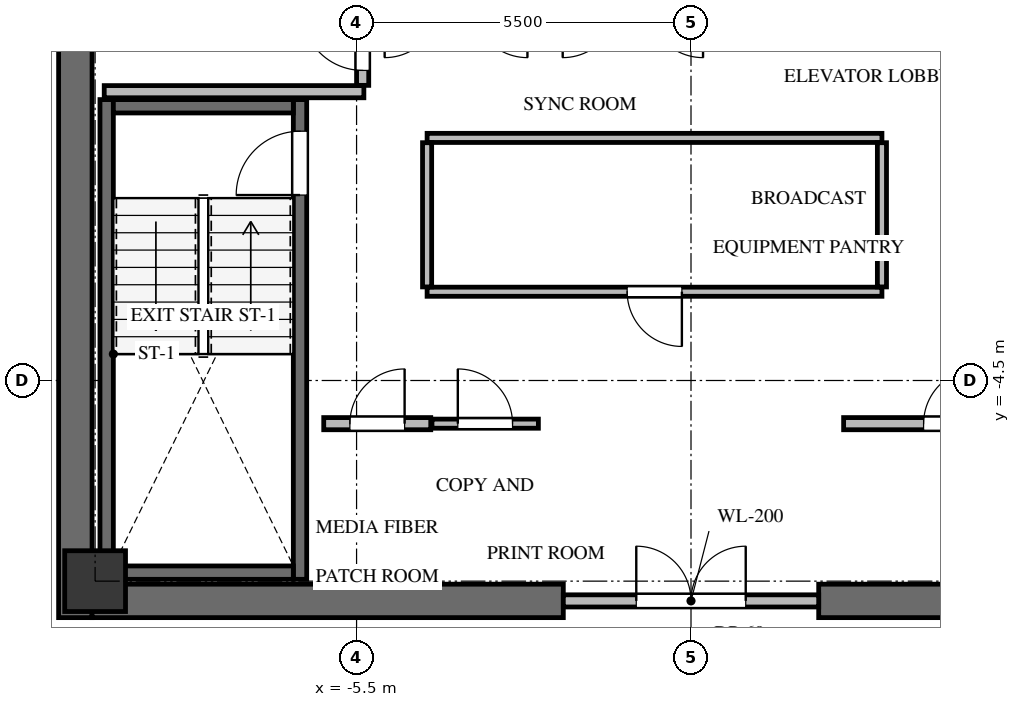
"""IFC4 building model, lengths in metres.
Left out: names, types, materials, properties, quantities, classifications, styles, units other than length and angle.
Written with IfcOpenShell. Run it as: python <this file> out.ifc"""

import sys

from ifc_helpers import new_model, si_unit, direction, frame, frame_2d, origin, origin_2d, place, context, subcontext, project, spatial, rectangle, extrude, source, transform, mapped, element, fill, save


model = new_model("IFC4")
c1 = context("Model", 3, precision=1e-05, world=origin(), true_north=direction((0.0, 1.0)))
c2 = subcontext(c1, "Body", "Model", "MODEL_VIEW")
j1 = project(units=[si_unit("LENGTHUNIT", "METRE"), si_unit("PLANEANGLEUNIT", "RADIAN")], contexts=[c1])
p1 = place(None, origin())
s1 = spatial("IfcSite", under=j1, at=p1, CompositionType="ELEMENT")
p2 = place(p1, origin())
s2 = spatial("IfcBuilding", under=s1, at=p2, CompositionType="ELEMENT")
p3 = place(p2, frame((0.0, 0.0, 221.6)))
s3 = spatial("IfcBuildingStorey", under=s2, at=p3, CompositionType="ELEMENT", Elevation=221.6)
p4 = place(p3, frame((-10.125, -8.4, 0.0), z_axis=(0.0, 0.0, 1.0), x_axis=(0.0, 1.0, 0.0)))
e1 = element("IfcWall", 1, at=p4, inside=s3, PredefinedType="SHEAR", context=c2, shape_type="SweptSolid", body=[
    extrude(rectangle(XDim=16.8, YDim=0.55, at=frame_2d((8.4, 0.0))), origin(), (0.0, 0.0, 1.0), 3.3),
])
for number, where, z_axis, x_axis in (
    (2, (-9.85, -8.125, 0.0), (0.0, 0.0, 1.0), (1.0, 0.0, 0.0)),
    (3, (2.1, -8.125, 0.0), (0.0, 0.0, 1.0), (1.0, 0.0, 0.0)),
):
    element("IfcWall", number, at=place(p3, frame(where, z_axis=z_axis, x_axis=x_axis)), inside=s3, PredefinedType="SHEAR", context=c2, shape_type="SweptSolid", body=[
        extrude(rectangle(XDim=7.75, YDim=0.55, at=frame_2d((3.875, 0.0))), origin(), (0.0, 0.0, 1.0), 3.3),
    ])
p5 = place(p3, frame((-6.43, -7.77, -0.24), z_axis=(0.0, 0.0, 1.0), x_axis=(0.0, 1.0, 0.0)))
e4 = element("IfcWall", 4, at=p5, inside=s3, PredefinedType="SHEAR", context=c2, shape_type="SweptSolid", body=[
    extrude(rectangle(XDim=7.89, YDim=0.22, at=frame_2d((3.945, 0.0))), origin(), (0.0, 0.0, 1.0), 3.3),
])
p6 = place(p5, frame((6.32, 0.0, 0.0)))
e5 = element("IfcOpeningElement", 5, at=p6, cuts=e4, PredefinedType="OPENING", context=c2, shape_type="SweptSolid", body=[
    extrude(rectangle(XDim=1.05, YDim=2.15, at=frame_2d((0.525, 1.075))), frame((0.0, 0.12, 0.0), z_axis=(0.0, -1.0, 0.0), x_axis=(1.0, 0.0, 0.0)), (0.0, 0.0, 1.0), 0.24),
])
p7 = place(p3, frame((-9.61, 0.12, -0.24), z_axis=(0.0, 0.0, 1.0), x_axis=(0.0, -1.0, 0.0)))
e6 = element("IfcWall", 6, at=p7, inside=s3, PredefinedType="SHEAR", context=c2, shape_type="SweptSolid", body=[
    extrude(rectangle(XDim=7.89, YDim=0.22, at=frame_2d((3.945, 0.0))), origin(), (0.0, 0.0, 1.0), 3.3),
])
for number, where, z_axis, x_axis in (
    (7, (-9.5, -7.66, -0.24), (0.0, 0.0, 1.0), (1.0, 0.0, 0.0)),
    (8, (-6.54, 0.01, -0.24), (0.0, 0.0, 1.0), (-1.0, 0.0, 0.0)),
):
    element("IfcWall", number, at=place(p3, frame(where, z_axis=z_axis, x_axis=x_axis)), inside=s3, PredefinedType="SHEAR", context=c2, shape_type="SweptSolid", body=[
        extrude(rectangle(XDim=2.96, YDim=0.22, at=frame_2d((1.48, 0.0))), origin(), (0.0, 0.0, 1.0), 3.3),
    ])
m1 = source(origin(), c2, "Body", "SweptSolid", [
    extrude(rectangle(XDim=1.0, YDim=1.0, at=origin_2d()), origin(), (0.0, 0.0, 1.0), 3.3),
])
p8 = place(p3, frame((-9.8, -7.8, -0.24), z_axis=(0.0, 0.0, 1.0), x_axis=(1.0, 0.0, 0.0)))
e9 = element("IfcColumn", 9, at=p8, inside=s3, PredefinedType="COLUMN", context=c2, shape_type="MappedRepresentation", body=[
    mapped(m1, transform((0.0, 0.0, 0.0), x_axis=(1.0, 0.0, 0.0), y_axis=(0.0, 1.0, 0.0), z_axis=(0.0, 0.0, 1.0), scale=1.0)),
])
p9 = place(p3, frame((-2.1, -8.125, 0.0), z_axis=(0.0, 0.0, 1.0), x_axis=(1.0, 0.0, 0.0)))
e10 = element("IfcWall", 10, at=p9, inside=s3, PredefinedType="SOLIDWALL", context=c2, shape_type="SweptSolid", body=[
    extrude(rectangle(XDim=4.2, YDim=0.2, at=frame_2d((2.1, 0.0))), origin(), (0.0, 0.0, 1.0), 3.045),
])
p10 = place(p9, frame((1.2, 0.0, 0.0)))
e11 = element("IfcOpeningElement", 11, at=p10, cuts=e10, PredefinedType="OPENING", context=c2, shape_type="SweptSolid", body=[
    extrude(rectangle(XDim=1.8, YDim=2.15, at=frame_2d((0.9, 1.075))), frame((0.0, 0.11, 0.0), z_axis=(0.0, -1.0, 0.0), x_axis=(1.0, 0.0, 0.0)), (0.0, 0.0, 1.0), 0.22),
])
p11 = place(p3, frame((-9.65, 0.25, 0.0), z_axis=(0.0, 0.0, 1.0), x_axis=(1.0, 0.0, 0.0)))
e12 = element("IfcWall", 12, at=p11, inside=s3, PredefinedType="SOLIDWALL", context=c2, shape_type="SweptSolid", body=[
    extrude(rectangle(XDim=4.27, YDim=0.2, at=frame_2d((2.135, 0.0))), origin(), (0.0, 0.0, 1.0), 3.045),
])
p12 = place(p3, frame((-5.4, 0.354, 0.0), z_axis=(0.0, 0.0, 1.0), x_axis=(0.0, 1.0, 0.0)))
e13 = element("IfcWall", 13, at=p12, inside=s3, PredefinedType="SOLIDWALL", context=c2, shape_type="SweptSolid", body=[
    extrude(rectangle(XDim=4.026, YDim=0.2, at=frame_2d((2.013, 0.0))), origin(), (0.0, 0.0, 1.0), 3.045),
])
p13 = place(p12, frame((0.246, 0.0, 0.0)))
e14 = element("IfcOpeningElement", 14, at=p13, cuts=e13, PredefinedType="OPENING", context=c2, shape_type="SweptSolid", body=[
    extrude(rectangle(XDim=1.0, YDim=2.15, at=frame_2d((0.5, 1.075))), frame((0.0, 0.11, 0.0), z_axis=(0.0, -1.0, 0.0), x_axis=(1.0, 0.0, 0.0)), (0.0, 0.0, 1.0), 0.22),
])
p14 = place(p3, frame((-6.04, -5.21, 0.0), z_axis=(0.0, 0.0, 1.0), x_axis=(1.0, 0.0, 0.0)))
e15 = element("IfcWall", 15, at=p14, inside=s3, PredefinedType="SOLIDWALL", context=c2, shape_type="SweptSolid", body=[
    extrude(rectangle(XDim=1.76, YDim=0.2, at=frame_2d((0.88, 0.0))), origin(), (0.0, 0.0, 1.0), 3.045),
])
p15 = place(p14, frame((0.43, 0.0, 0.0)))
e16 = element("IfcOpeningElement", 16, at=p15, cuts=e15, PredefinedType="OPENING", context=c2, shape_type="SweptSolid", body=[
    extrude(rectangle(XDim=0.9, YDim=2.05, at=frame_2d((0.45, 1.025))), frame((0.0, 0.11, 0.0), z_axis=(0.0, -1.0, 0.0), x_axis=(1.0, 0.0, 0.0)), (0.0, 0.0, 1.0), 0.22),
])
p16 = place(p3, frame((-4.26, -5.21, 0.0), z_axis=(0.0, 0.0, 1.0), x_axis=(1.0, 0.0, 0.0)))
e17 = element("IfcWall", 17, at=p16, inside=s3, PredefinedType="PARTITIONING", context=c2, shape_type="SweptSolid", body=[
    extrude(rectangle(XDim=1.75, YDim=0.15, at=frame_2d((0.875, 0.0))), origin(), (0.0, 0.0, 1.0), 3.045),
])
p17 = place(p16, frame((0.425, 0.0, 0.0)))
e18 = element("IfcOpeningElement", 18, at=p17, cuts=e17, PredefinedType="OPENING", context=c2, shape_type="SweptSolid", body=[
    extrude(rectangle(XDim=0.9, YDim=2.05, at=frame_2d((0.45, 1.025))), frame((0.0, 0.085, 0.0), z_axis=(0.0, -1.0, 0.0), x_axis=(1.0, 0.0, 0.0)), (0.0, 0.0, 1.0), 0.17),
])
p18 = place(p3, frame((2.51, -5.21, 0.0), z_axis=(0.0, 0.0, 1.0), x_axis=(1.0, 0.0, 0.0)))
e19 = element("IfcWall", 19, at=p18, inside=s3, PredefinedType="SOLIDWALL", context=c2, shape_type="SweptSolid", body=[
    extrude(rectangle(XDim=3.53, YDim=0.2, at=frame_2d((1.765, 0.0))), origin(), (0.0, 0.0, 1.0), 3.045),
])
p19 = place(p18, frame((1.315, 0.0, 0.0)))
e20 = element("IfcOpeningElement", 20, at=p19, cuts=e19, PredefinedType="OPENING", context=c2, shape_type="SweptSolid", body=[
    extrude(rectangle(XDim=0.9, YDim=2.05, at=frame_2d((0.45, 1.025))), frame((0.0, 0.11, 0.0), z_axis=(0.0, -1.0, 0.0), x_axis=(1.0, 0.0, 0.0)), (0.0, 0.0, 1.0), 0.22),
])
p20 = place(p3, frame((3.14, -3.04, 0.0), z_axis=(0.0, 0.0, 1.0), x_axis=(-1.0, 0.0, 0.0)))
e21 = element("IfcWall", 21, at=p20, inside=s3, PredefinedType="PARTITIONING", context=c2, shape_type="SweptSolid", body=[
    extrude(rectangle(XDim=7.48, YDim=0.15, at=frame_2d((3.74, 0.0))), origin(), (0.0, 0.0, 1.0), 3.045),
])
p21 = place(p20, frame((3.29, 0.0, 0.0)))
e22 = element("IfcOpeningElement", 22, at=p21, cuts=e21, PredefinedType="OPENING", context=c2, shape_type="SweptSolid", body=[
    extrude(rectangle(XDim=0.9, YDim=2.05, at=frame_2d((0.45, 1.025))), frame((0.0, 0.085, 0.0), z_axis=(0.0, -1.0, 0.0), x_axis=(1.0, 0.0, 0.0)), (0.0, 0.0, 1.0), 0.17),
])
p22 = place(p3, frame((-4.34, -0.51, 0.0), z_axis=(0.0, 0.0, 1.0), x_axis=(1.0, 0.0, 0.0)))
e23 = element("IfcWall", 23, at=p22, inside=s3, PredefinedType="PARTITIONING", context=c2, shape_type="SweptSolid", body=[
    extrude(rectangle(XDim=7.48, YDim=0.15, at=frame_2d((3.74, 0.0))), origin(), (0.0, 0.0, 1.0), 3.045),
])
for number, where, z_axis, x_axis in (
    (24, (-4.34, -2.961, 0.0), (0.0, 0.0, 1.0), (0.0, 1.0, 0.0)),
    (25, (3.14, -0.589, 0.0), (0.0, 0.0, 1.0), (0.0, -1.0, 0.0)),
):
    element("IfcWall", number, at=place(p3, frame(where, z_axis=z_axis, x_axis=x_axis)), inside=s3, PredefinedType="PARTITIONING", context=c2, shape_type="SweptSolid", body=[
        extrude(rectangle(XDim=2.372, YDim=0.15, at=frame_2d((1.186, 0.0))), origin(), (0.0, 0.0, 1.0), 3.045),
    ])
m2 = source(origin(), c2, "Body", "SweptSolid", [
    extrude(rectangle(XDim=1.05, YDim=2.15, at=frame_2d((0.525, 1.075))), frame((0.0, 0.025, 0.0), z_axis=(0.0, -1.0, 0.0), x_axis=(1.0, 0.0, 0.0)), (0.0, 0.0, 1.0), 0.05),
])
p23 = place(p6, origin())
e26 = element("IfcDoor", 26, at=p23, inside=s3, OperationType="SINGLE_SWING_LEFT", PredefinedType="DOOR", context=c2, shape_type="MappedRepresentation", body=[
    mapped(m2, transform((0.0, 0.0, 0.0), x_axis=(1.0, 0.0, 0.0), y_axis=(0.0, 1.0, 0.0), z_axis=(0.0, 0.0, 1.0), scale=1.0)),
])
fill(e5, e26)
m3 = source(origin(), c2, "Body", "SweptSolid", [
    extrude(rectangle(XDim=1.8, YDim=2.15, at=frame_2d((0.9, 1.075))), frame((0.0, 0.025, 0.0), z_axis=(0.0, -1.0, 0.0), x_axis=(1.0, 0.0, 0.0)), (0.0, 0.0, 1.0), 0.05),
])
p24 = place(p10, origin())
e27 = element("IfcDoor", 27, at=p24, inside=s3, OperationType="DOUBLE_DOOR_SINGLE_SWING", PredefinedType="DOOR", context=c2, shape_type="MappedRepresentation", body=[
    mapped(m3, transform((0.0, 0.0, 0.0), x_axis=(1.0, 0.0, 0.0), y_axis=(0.0, 1.0, 0.0), z_axis=(0.0, 0.0, 1.0), scale=1.0)),
])
fill(e11, e27)
m4 = source(origin(), c2, "Body", "SweptSolid", [
    extrude(rectangle(XDim=1.0, YDim=2.15, at=frame_2d((0.5, 1.075))), frame((0.0, 0.025, 0.0), z_axis=(0.0, -1.0, 0.0), x_axis=(1.0, 0.0, 0.0)), (0.0, 0.0, 1.0), 0.05),
])
p25 = place(p13, origin())
e28 = element("IfcDoor", 28, at=p25, inside=s3, OperationType="SINGLE_SWING_RIGHT", PredefinedType="DOOR", context=c2, shape_type="MappedRepresentation", body=[
    mapped(m4, transform((0.0, 0.0, 0.0), x_axis=(1.0, 0.0, 0.0), y_axis=(0.0, 1.0, 0.0), z_axis=(0.0, 0.0, 1.0), scale=1.0)),
])
fill(e14, e28)
m5 = source(origin(), c2, "Body", "SweptSolid", [
    extrude(rectangle(XDim=0.9, YDim=2.05, at=frame_2d((0.45, 1.025))), frame((0.0, 0.025, 0.0), z_axis=(0.0, -1.0, 0.0), x_axis=(1.0, 0.0, 0.0)), (0.0, 0.0, 1.0), 0.05),
])
p26 = place(p15, origin())
e29 = element("IfcDoor", 29, at=p26, inside=s3, OperationType="SINGLE_SWING_RIGHT", PredefinedType="DOOR", context=c2, shape_type="MappedRepresentation", body=[
    mapped(m5, transform((0.0, 0.0, 0.0), x_axis=(1.0, 0.0, 0.0), y_axis=(0.0, 1.0, 0.0), z_axis=(0.0, 0.0, 1.0), scale=1.0)),
])
fill(e16, e29)
m6 = source(origin(), c2, "Body", "SweptSolid", [
    extrude(rectangle(XDim=0.9, YDim=2.05, at=frame_2d((0.45, 1.025))), frame((0.0, 0.025, 0.0), z_axis=(0.0, -1.0, 0.0), x_axis=(1.0, 0.0, 0.0)), (0.0, 0.0, 1.0), 0.05),
])
p27 = place(p17, origin())
e30 = element("IfcDoor", 30, at=p27, inside=s3, OperationType="SINGLE_SWING_LEFT", PredefinedType="DOOR", context=c2, shape_type="MappedRepresentation", body=[
    mapped(m6, transform((0.0, 0.0, 0.0), x_axis=(1.0, 0.0, 0.0), y_axis=(0.0, 1.0, 0.0), z_axis=(0.0, 0.0, 1.0), scale=1.0)),
])
fill(e18, e30)
p28 = place(p19, origin())
e31 = element("IfcDoor", 31, at=p28, inside=s3, OperationType="SINGLE_SWING_RIGHT", PredefinedType="DOOR", context=c2, shape_type="MappedRepresentation", body=[
    mapped(m5, transform((0.0, 0.0, 0.0), x_axis=(1.0, 0.0, 0.0), y_axis=(0.0, 1.0, 0.0), z_axis=(0.0, 0.0, 1.0), scale=1.0)),
])
fill(e20, e31)
p29 = place(p21, origin())
e32 = element("IfcDoor", 32, at=p29, inside=s3, OperationType="SINGLE_SWING_LEFT", PredefinedType="DOOR", context=c2, shape_type="MappedRepresentation", body=[
    mapped(m6, transform((0.0, 0.0, 0.0), x_axis=(1.0, 0.0, 0.0), y_axis=(0.0, 1.0, 0.0), z_axis=(0.0, 0.0, 1.0), scale=1.0)),
])
fill(e22, e32)
save(model, sys.argv[1])
